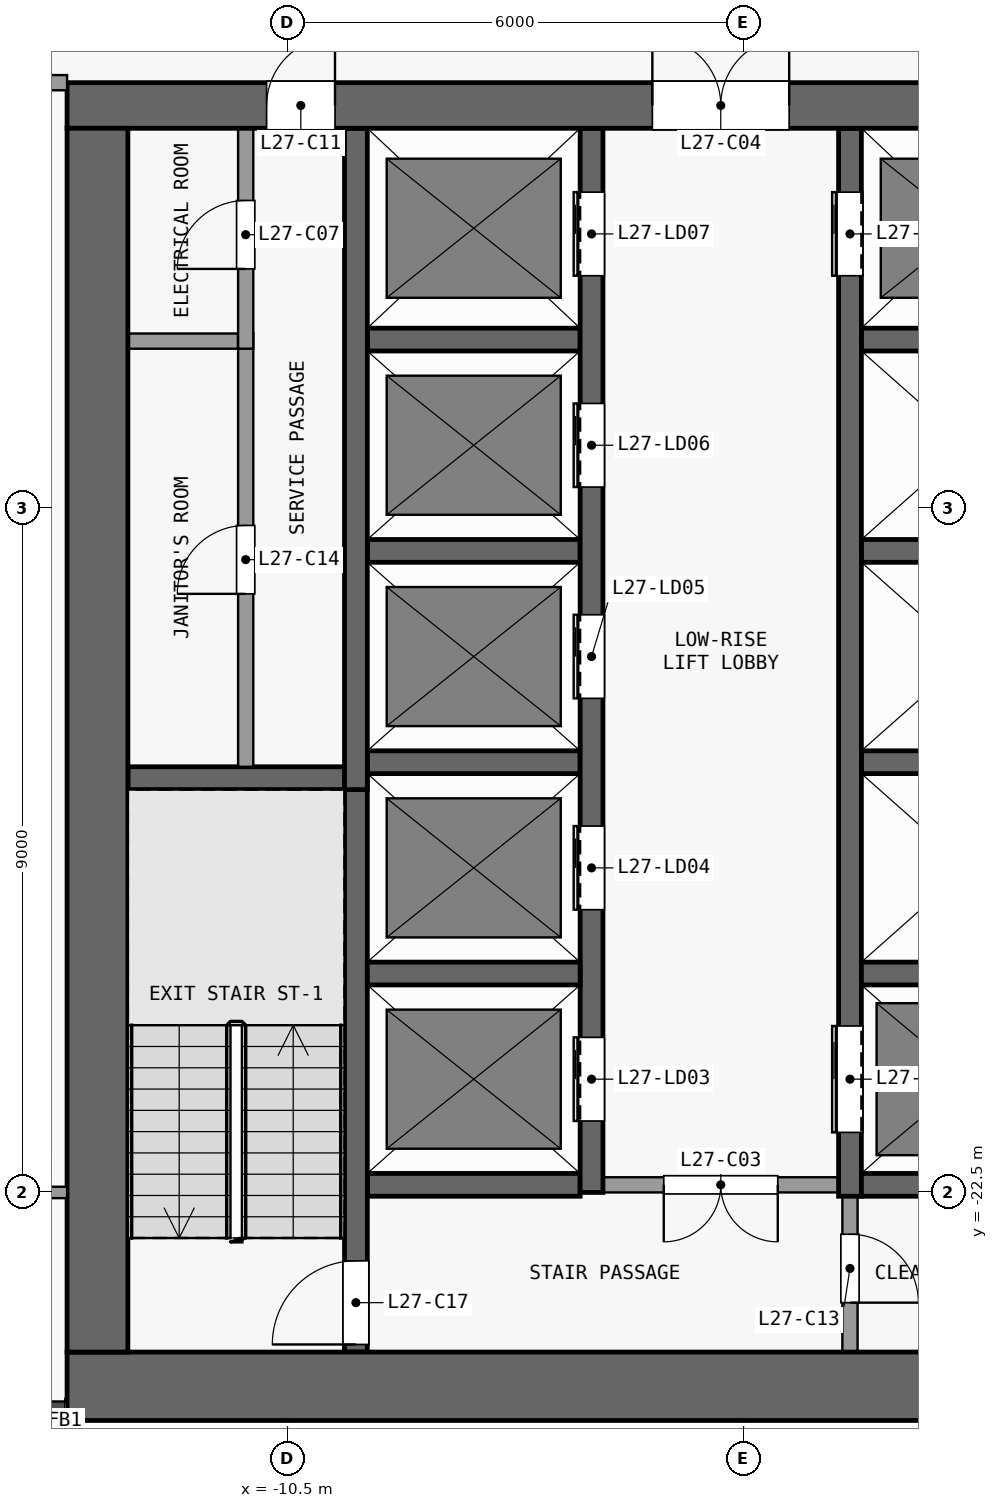
"""IFC4 building model, lengths in metres.
Left out: names, types, materials, properties, quantities, classifications, styles, units other than length and angle.
Written with IfcOpenShell. Run it as: python <this file> out.ifc"""

import sys

from ifc_helpers import new_model, si_unit, direction, frame, frame_2d, origin, place, context, subcontext, project, spatial, rectangle, extrude, element, fill, save


model = new_model("IFC4")
c1 = context("Model", 3, precision=1e-05, world=origin(), true_north=direction((0.0, 1.0)))
c2 = subcontext(c1, "Body", "Model", "MODEL_VIEW")
j1 = project(units=[si_unit("LENGTHUNIT", "METRE"), si_unit("PLANEANGLEUNIT", "RADIAN")], contexts=[c1])
p1 = place(None, origin())
s1 = spatial("IfcSite", under=j1, at=p1, CompositionType="ELEMENT")
p2 = place(p1, origin())
s2 = spatial("IfcBuilding", under=s1, at=p2, CompositionType="ELEMENT")
p3 = place(p2, frame((0.0, 0.0, 109.9)))
s3 = spatial("IfcBuildingStorey", under=s2, at=p3, CompositionType="ELEMENT", Elevation=109.9)
p4 = place(p3, frame((-13.4, -25.05, 0.0), z_axis=(0.0, 0.0, 1.0), x_axis=(1.0, 0.0, 0.0)))
e1 = element("IfcWall", 1, at=p4, inside=s3, PredefinedType="SHEAR", context=c2, shape_type="SweptSolid", body=[
    extrude(rectangle(XDim=26.8, YDim=0.9, at=frame_2d((13.4, 0.0))), origin(), (0.0, 0.0, 1.0), 3.3),
])
p5 = place(p3, frame((-13.4, -8.2, 0.0), z_axis=(0.0, 0.0, 1.0), x_axis=(1.0, 0.0, 0.0)))
e2 = element("IfcWall", 2, at=p5, inside=s3, PredefinedType="SHEAR", context=c2, shape_type="SweptSolid", body=[
    extrude(rectangle(XDim=26.8, YDim=0.6, at=frame_2d((13.4, 0.0))), origin(), (0.0, 0.0, 1.0), 3.3),
])
p6 = place(p5, frame((7.7, 0.0, 0.0)))
e3 = element("IfcOpeningElement", 3, at=p6, cuts=e2, PredefinedType="OPENING", context=c2, shape_type="SweptSolid", body=[
    extrude(rectangle(XDim=1.8, YDim=2.1, at=frame_2d((0.9, 1.05))), frame((0.0, 0.31, 0.0), z_axis=(0.0, -1.0, 0.0), x_axis=(1.0, 0.0, 0.0)), (0.0, 0.0, 1.0), 0.62),
])
p7 = place(p5, frame((17.3, 0.0, 0.0)))
e4 = element("IfcOpeningElement", 4, at=p7, cuts=e2, PredefinedType="OPENING", context=c2, shape_type="SweptSolid", body=[
    extrude(rectangle(XDim=1.8, YDim=2.1, at=frame_2d((0.9, 1.05))), frame((0.0, 0.31, 0.0), z_axis=(0.0, -1.0, 0.0), x_axis=(1.0, 0.0, 0.0)), (0.0, 0.0, 1.0), 0.62),
])
p8 = place(p5, frame((2.625, 0.0, 0.0)))
e5 = element("IfcOpeningElement", 5, at=p8, cuts=e2, PredefinedType="OPENING", context=c2, shape_type="SweptSolid", body=[
    extrude(rectangle(XDim=0.9, YDim=2.1, at=frame_2d((0.45, 1.05))), frame((0.0, 0.31, 0.0), z_axis=(0.0, -1.0, 0.0), x_axis=(1.0, 0.0, 0.0)), (0.0, 0.0, 1.0), 0.62),
])
p9 = place(p5, frame((23.275, 0.0, 0.0)))
e6 = element("IfcOpeningElement", 6, at=p9, cuts=e2, PredefinedType="OPENING", context=c2, shape_type="SweptSolid", body=[
    extrude(rectangle(XDim=0.9, YDim=2.1, at=frame_2d((0.45, 1.05))), frame((0.0, 0.31, 0.0), z_axis=(0.0, -1.0, 0.0), x_axis=(1.0, 0.0, 0.0)), (0.0, 0.0, 1.0), 0.62),
])
p10 = place(p3, frame((-13.0, -24.6, 0.0), z_axis=(0.0, 0.0, 1.0), x_axis=(0.0, 1.0, 0.0)))
e7 = element("IfcWall", 7, at=p10, inside=s3, PredefinedType="SHEAR", context=c2, shape_type="SweptSolid", body=[
    extrude(rectangle(XDim=16.1, YDim=0.8, at=frame_2d((8.05, 0.0))), origin(), (0.0, 0.0, 1.0), 3.3),
])
p11 = place(p3, frame((-9.45, -22.4, 0.0), z_axis=(0.0, 0.0, 1.0), x_axis=(1.0, 0.0, 0.0)))
e8 = element("IfcWall", 8, at=p11, inside=s3, PredefinedType="SHEAR", context=c2, shape_type="SweptSolid", body=[
    extrude(rectangle(XDim=2.8, YDim=0.3, at=frame_2d((1.4, 0.0))), origin(), (0.0, 0.0, 1.0), 3.3),
])
p12 = place(p3, frame((-3.25, -22.4, 0.0), z_axis=(0.0, 0.0, 1.0), x_axis=(-1.0, 0.0, 0.0)))
e9 = element("IfcWall", 9, at=p12, inside=s3, PredefinedType="PARTITIONING", context=c2, shape_type="SweptSolid", body=[
    extrude(rectangle(XDim=3.1, YDim=0.2, at=frame_2d((1.55, 0.0))), origin(), (0.0, 0.0, 1.0), 3.3),
])
p13 = place(p12, frame((0.8, 0.0, 0.0)))
e10 = element("IfcOpeningElement", 10, at=p13, cuts=e9, PredefinedType="OPENING", context=c2, shape_type="SweptSolid", body=[
    extrude(rectangle(XDim=1.5, YDim=2.1, at=frame_2d((0.75, 1.05))), frame((0.0, 0.11, 0.0), z_axis=(0.0, -1.0, 0.0), x_axis=(1.0, 0.0, 0.0)), (0.0, 0.0, 1.0), 0.22),
])
p14 = place(p3, frame((-2.95, -22.4, 0.0), z_axis=(0.0, 0.0, 1.0), x_axis=(1.0, 0.0, 0.0)))
e11 = element("IfcWall", 11, at=p14, inside=s3, PredefinedType="SHEAR", context=c2, shape_type="SweptSolid", body=[
    extrude(rectangle(XDim=6.2, YDim=0.3, at=frame_2d((3.1, 0.0))), origin(), (0.0, 0.0, 1.0), 3.3),
])
for number, where, z_axis, x_axis in (
    (12, (-9.45, -19.62, 0.0), (0.0, 0.0, 1.0), (1.0, 0.0, 0.0)),
    (13, (-2.95, -19.62, 0.0), (0.0, 0.0, 1.0), (1.0, 0.0, 0.0)),
):
    element("IfcWall", number, at=place(p3, frame(where, z_axis=z_axis, x_axis=x_axis)), inside=s3, PredefinedType="SHEAR", context=c2, shape_type="SweptSolid", body=[
        extrude(rectangle(XDim=2.8, YDim=0.3, at=frame_2d((1.4, 0.0))), origin(), (0.0, 0.0, 1.0), 3.3),
    ])
p15 = place(p3, frame((-12.6, -17.05, 0.0), z_axis=(0.0, 0.0, 1.0), x_axis=(1.0, 0.0, 0.0)))
e14 = element("IfcWall", 14, at=p15, inside=s3, PredefinedType="SHEAR", context=c2, shape_type="SweptSolid", body=[
    extrude(rectangle(XDim=2.85, YDim=0.3, at=frame_2d((1.425, 0.0))), origin(), (0.0, 0.0, 1.0), 3.3),
])
for number, where, z_axis, x_axis in (
    (15, (-9.45, -16.84, 0.0), (0.0, 0.0, 1.0), (1.0, 0.0, 0.0)),
    (16, (-2.95, -16.84, 0.0), (0.0, 0.0, 1.0), (1.0, 0.0, 0.0)),
    (17, (-9.45, -14.06, 0.0), (0.0, 0.0, 1.0), (1.0, 0.0, 0.0)),
    (18, (-2.95, -14.06, 0.0), (0.0, 0.0, 1.0), (1.0, 0.0, 0.0)),
):
    element("IfcWall", number, at=place(p3, frame(where, z_axis=z_axis, x_axis=x_axis)), inside=s3, PredefinedType="SHEAR", context=c2, shape_type="SweptSolid", body=[
        extrude(rectangle(XDim=2.8, YDim=0.3, at=frame_2d((1.4, 0.0))), origin(), (0.0, 0.0, 1.0), 3.3),
    ])
p16 = place(p3, frame((-12.6, -11.3, 0.0), z_axis=(0.0, 0.0, 1.0), x_axis=(1.0, 0.0, 0.0)))
e19 = element("IfcWall", 19, at=p16, inside=s3, PredefinedType="PARTITIONING", context=c2, shape_type="SweptSolid", body=[
    extrude(rectangle(XDim=1.45, YDim=0.2, at=frame_2d((0.725, 0.0))), origin(), (0.0, 0.0, 1.0), 3.3),
])
for number, where, z_axis, x_axis in (
    (20, (-9.45, -11.28, 0.0), (0.0, 0.0, 1.0), (1.0, 0.0, 0.0)),
    (21, (-2.95, -11.28, 0.0), (0.0, 0.0, 1.0), (1.0, 0.0, 0.0)),
):
    element("IfcWall", number, at=place(p3, frame(where, z_axis=z_axis, x_axis=x_axis)), inside=s3, PredefinedType="SHEAR", context=c2, shape_type="SweptSolid", body=[
        extrude(rectangle(XDim=2.8, YDim=0.3, at=frame_2d((1.4, 0.0))), origin(), (0.0, 0.0, 1.0), 3.3),
    ])
p17 = place(p3, frame((-11.05, -16.9, 0.0), z_axis=(0.0, 0.0, 1.0), x_axis=(0.0, 1.0, 0.0)))
e22 = element("IfcWall", 22, at=p17, inside=s3, PredefinedType="PARTITIONING", context=c2, shape_type="SweptSolid", body=[
    extrude(rectangle(XDim=5.7, YDim=0.2, at=frame_2d((2.85, 0.0))), origin(), (0.0, 0.0, 1.0), 3.3),
])
p18 = place(p17, frame((2.275, 0.0, 0.0)))
e23 = element("IfcOpeningElement", 23, at=p18, cuts=e22, PredefinedType="OPENING", context=c2, shape_type="SweptSolid", body=[
    extrude(rectangle(XDim=0.9, YDim=2.1, at=frame_2d((0.45, 1.05))), frame((0.0, 0.11, 0.0), z_axis=(0.0, -1.0, 0.0), x_axis=(1.0, 0.0, 0.0)), (0.0, 0.0, 1.0), 0.22),
])
p19 = place(p3, frame((-11.05, -11.4, 0.0), z_axis=(0.0, 0.0, 1.0), x_axis=(0.0, 1.0, 0.0)))
e24 = element("IfcWall", 24, at=p19, inside=s3, PredefinedType="PARTITIONING", context=c2, shape_type="SweptSolid", body=[
    extrude(rectangle(XDim=2.9, YDim=0.2, at=frame_2d((1.45, 0.0))), origin(), (0.0, 0.0, 1.0), 3.3),
])
p20 = place(p19, frame((1.05, 0.0, 0.0)))
e25 = element("IfcOpeningElement", 25, at=p20, cuts=e24, PredefinedType="OPENING", context=c2, shape_type="SweptSolid", body=[
    extrude(rectangle(XDim=0.9, YDim=2.1, at=frame_2d((0.45, 1.05))), frame((0.0, 0.11, 0.0), z_axis=(0.0, -1.0, 0.0), x_axis=(1.0, 0.0, 0.0)), (0.0, 0.0, 1.0), 0.22),
])
p21 = place(p3, frame((-9.6, -24.6, 0.0), z_axis=(0.0, 0.0, 1.0), x_axis=(0.0, 1.0, 0.0)))
e26 = element("IfcWall", 26, at=p21, inside=s3, PredefinedType="SHEAR", context=c2, shape_type="SweptSolid", body=[
    extrude(rectangle(XDim=7.7, YDim=0.3, at=frame_2d((3.85, 0.0))), origin(), (0.0, 0.0, 1.0), 3.3),
])
p22 = place(p21, frame((0.1, 0.0, 0.0)))
e27 = element("IfcOpeningElement", 27, at=p22, cuts=e26, PredefinedType="OPENING", context=c2, shape_type="SweptSolid", body=[
    extrude(rectangle(XDim=1.1, YDim=2.1, at=frame_2d((0.55, 1.05))), frame((0.0, 0.16, 0.0), z_axis=(0.0, -1.0, 0.0), x_axis=(1.0, 0.0, 0.0)), (0.0, 0.0, 1.0), 0.32),
])
p23 = place(p3, frame((-9.6, -17.2, 0.0), z_axis=(0.0, 0.0, 1.0), x_axis=(0.0, 1.0, 0.0)))
e28 = element("IfcWall", 28, at=p23, inside=s3, PredefinedType="SHEAR", context=c2, shape_type="SweptSolid", body=[
    extrude(rectangle(XDim=8.7, YDim=0.3, at=frame_2d((4.35, 0.0))), origin(), (0.0, 0.0, 1.0), 3.3),
])
p24 = place(p3, frame((-6.5, -22.5, 0.0), z_axis=(0.0, 0.0, 1.0), x_axis=(0.0, 1.0, 0.0)))
e29 = element("IfcWall", 29, at=p24, inside=s3, PredefinedType="SHEAR", context=c2, shape_type="SweptSolid", body=[
    extrude(rectangle(XDim=14.0, YDim=0.3, at=frame_2d((7.0, 0.0))), origin(), (0.0, 0.0, 1.0), 3.3),
])
p25 = place(p24, frame((0.94, 0.0, 0.0)))
e30 = element("IfcOpeningElement", 30, at=p25, cuts=e29, PredefinedType="OPENING", context=c2, shape_type="SweptSolid", body=[
    extrude(rectangle(XDim=1.1, YDim=2.1, at=frame_2d((0.55, 1.05))), frame((0.0, 0.16, 0.0), z_axis=(0.0, -1.0, 0.0), x_axis=(1.0, 0.0, 0.0)), (0.0, 0.0, 1.0), 0.32),
])
p26 = place(p24, frame((3.72, 0.0, 0.0)))
e31 = element("IfcOpeningElement", 31, at=p26, cuts=e29, PredefinedType="OPENING", context=c2, shape_type="SweptSolid", body=[
    extrude(rectangle(XDim=1.1, YDim=2.1, at=frame_2d((0.55, 1.05))), frame((0.0, 0.16, 0.0), z_axis=(0.0, -1.0, 0.0), x_axis=(1.0, 0.0, 0.0)), (0.0, 0.0, 1.0), 0.32),
])
p27 = place(p24, frame((6.5, 0.0, 0.0)))
e32 = element("IfcOpeningElement", 32, at=p27, cuts=e29, PredefinedType="OPENING", context=c2, shape_type="SweptSolid", body=[
    extrude(rectangle(XDim=1.1, YDim=2.1, at=frame_2d((0.55, 1.05))), frame((0.0, 0.16, 0.0), z_axis=(0.0, -1.0, 0.0), x_axis=(1.0, 0.0, 0.0)), (0.0, 0.0, 1.0), 0.32),
])
p28 = place(p24, frame((9.28, 0.0, 0.0)))
e33 = element("IfcOpeningElement", 33, at=p28, cuts=e29, PredefinedType="OPENING", context=c2, shape_type="SweptSolid", body=[
    extrude(rectangle(XDim=1.1, YDim=2.1, at=frame_2d((0.55, 1.05))), frame((0.0, 0.16, 0.0), z_axis=(0.0, -1.0, 0.0), x_axis=(1.0, 0.0, 0.0)), (0.0, 0.0, 1.0), 0.32),
])
p29 = place(p24, frame((12.06, 0.0, 0.0)))
e34 = element("IfcOpeningElement", 34, at=p29, cuts=e29, PredefinedType="OPENING", context=c2, shape_type="SweptSolid", body=[
    extrude(rectangle(XDim=1.1, YDim=2.1, at=frame_2d((0.55, 1.05))), frame((0.0, 0.16, 0.0), z_axis=(0.0, -1.0, 0.0), x_axis=(1.0, 0.0, 0.0)), (0.0, 0.0, 1.0), 0.32),
])
p30 = place(p3, frame((-3.1, -22.55, 0.0), z_axis=(0.0, 0.0, 1.0), x_axis=(0.0, -1.0, 0.0)))
e35 = element("IfcWall", 35, at=p30, inside=s3, PredefinedType="PARTITIONING", context=c2, shape_type="SweptSolid", body=[
    extrude(rectangle(XDim=2.05, YDim=0.2, at=frame_2d((1.025, 0.0))), origin(), (0.0, 0.0, 1.0), 3.3),
])
p31 = place(p30, frame((0.5, 0.0, 0.0)))
e36 = element("IfcOpeningElement", 36, at=p31, cuts=e35, PredefinedType="OPENING", context=c2, shape_type="SweptSolid", body=[
    extrude(rectangle(XDim=0.9, YDim=2.1, at=frame_2d((0.45, 1.05))), frame((0.0, 0.11, 0.0), z_axis=(0.0, -1.0, 0.0), x_axis=(1.0, 0.0, 0.0)), (0.0, 0.0, 1.0), 0.22),
])
p32 = place(p3, frame((-3.1, -22.55, 0.0), z_axis=(0.0, 0.0, 1.0), x_axis=(0.0, 1.0, 0.0)))
e37 = element("IfcWall", 37, at=p32, inside=s3, PredefinedType="SHEAR", context=c2, shape_type="SweptSolid", body=[
    extrude(rectangle(XDim=14.05, YDim=0.3, at=frame_2d((7.025, 0.0))), origin(), (0.0, 0.0, 1.0), 3.3),
])
p33 = place(p32, frame((12.11, 0.0, 0.0)))
e38 = element("IfcOpeningElement", 38, at=p33, cuts=e37, PredefinedType="OPENING", context=c2, shape_type="SweptSolid", body=[
    extrude(rectangle(XDim=1.1, YDim=2.1, at=frame_2d((0.55, 1.05))), frame((0.0, 0.16, 0.0), z_axis=(0.0, -1.0, 0.0), x_axis=(1.0, 0.0, 0.0)), (0.0, 0.0, 1.0), 0.32),
])
p34 = place(p32, frame((0.84, 0.0, 0.0)))
e39 = element("IfcOpeningElement", 39, at=p34, cuts=e37, PredefinedType="OPENING", context=c2, shape_type="SweptSolid", body=[
    extrude(rectangle(XDim=1.4, YDim=2.1, at=frame_2d((0.7, 1.05))), frame((0.0, 0.16, 0.0), z_axis=(0.0, -1.0, 0.0), x_axis=(1.0, 0.0, 0.0)), (0.0, 0.0, 1.0), 0.32),
])
p35 = place(p3, frame((-16.325, -22.5, 0.0), z_axis=(0.0, 0.0, 1.0), x_axis=(1.0, 0.0, 0.0)))
e40 = element("IfcWall", 40, at=p35, inside=s3, PredefinedType="PARTITIONING", context=c2, shape_type="SweptSolid", body=[
    extrude(rectangle(XDim=2.925, YDim=0.15, at=frame_2d((1.462, 0.0))), origin(), (0.0, 0.0, 1.0), 3.3),
])
p36 = place(p35, frame((1.0, 0.0, 0.0)))
e41 = element("IfcOpeningElement", 41, at=p36, cuts=e40, PredefinedType="OPENING", context=c2, shape_type="SweptSolid", body=[
    extrude(rectangle(XDim=0.9, YDim=2.1, at=frame_2d((0.45, 1.05))), frame((0.0, 0.085, 0.0), z_axis=(0.0, -1.0, 0.0), x_axis=(1.0, 0.0, 0.0)), (0.0, 0.0, 1.0), 0.17),
])
p37 = place(p3, frame((-25.25, -7.9, 0.0), z_axis=(0.0, 0.0, 1.0), x_axis=(1.0, 0.0, 0.0)))
e42 = element("IfcWall", 42, at=p37, inside=s3, PredefinedType="PARTITIONING", context=c2, shape_type="SweptSolid", body=[
    extrude(rectangle(XDim=11.85, YDim=0.2, at=frame_2d((5.925, 0.0))), origin(), (0.0, 0.0, 1.0), 3.3),
])
p38 = place(p37, frame((9.85, 0.0, 0.0)))
e43 = element("IfcOpeningElement", 43, at=p38, cuts=e42, PredefinedType="OPENING", context=c2, shape_type="SweptSolid", body=[
    extrude(rectangle(XDim=1.0, YDim=2.1, at=frame_2d((0.5, 1.05))), frame((0.0, 0.11, 0.0), z_axis=(0.0, -1.0, 0.0), x_axis=(1.0, 0.0, 0.0)), (0.0, 0.0, 1.0), 0.22),
])
p39 = place(p25, origin())
e44 = element("IfcDoor", 44, at=p39, inside=s3, OperationType="DOUBLE_DOOR_SLIDING", PredefinedType="DOOR", context=c2, shape_type="SweptSolid", body=[
    extrude(rectangle(XDim=1.1, YDim=2.1, at=frame_2d((0.55, 1.05))), frame((0.0, 0.025, 0.0), z_axis=(0.0, -1.0, 0.0), x_axis=(1.0, 0.0, 0.0)), (0.0, 0.0, 1.0), 0.05),
])
fill(e30, e44)
p40 = place(p26, origin())
e45 = element("IfcDoor", 45, at=p40, inside=s3, OperationType="DOUBLE_DOOR_SLIDING", PredefinedType="DOOR", context=c2, shape_type="SweptSolid", body=[
    extrude(rectangle(XDim=1.1, YDim=2.1, at=frame_2d((0.55, 1.05))), frame((0.0, 0.025, 0.0), z_axis=(0.0, -1.0, 0.0), x_axis=(1.0, 0.0, 0.0)), (0.0, 0.0, 1.0), 0.05),
])
fill(e31, e45)
p41 = place(p27, origin())
e46 = element("IfcDoor", 46, at=p41, inside=s3, OperationType="DOUBLE_DOOR_SLIDING", PredefinedType="DOOR", context=c2, shape_type="SweptSolid", body=[
    extrude(rectangle(XDim=1.1, YDim=2.1, at=frame_2d((0.55, 1.05))), frame((0.0, 0.025, 0.0), z_axis=(0.0, -1.0, 0.0), x_axis=(1.0, 0.0, 0.0)), (0.0, 0.0, 1.0), 0.05),
])
fill(e32, e46)
p42 = place(p28, origin())
e47 = element("IfcDoor", 47, at=p42, inside=s3, OperationType="DOUBLE_DOOR_SLIDING", PredefinedType="DOOR", context=c2, shape_type="SweptSolid", body=[
    extrude(rectangle(XDim=1.1, YDim=2.1, at=frame_2d((0.55, 1.05))), frame((0.0, 0.025, 0.0), z_axis=(0.0, -1.0, 0.0), x_axis=(1.0, 0.0, 0.0)), (0.0, 0.0, 1.0), 0.05),
])
fill(e33, e47)
p43 = place(p29, origin())
e48 = element("IfcDoor", 48, at=p43, inside=s3, OperationType="DOUBLE_DOOR_SLIDING", PredefinedType="DOOR", context=c2, shape_type="SweptSolid", body=[
    extrude(rectangle(XDim=1.1, YDim=2.1, at=frame_2d((0.55, 1.05))), frame((0.0, 0.025, 0.0), z_axis=(0.0, -1.0, 0.0), x_axis=(1.0, 0.0, 0.0)), (0.0, 0.0, 1.0), 0.05),
])
fill(e34, e48)
p44 = place(p33, origin())
e49 = element("IfcDoor", 49, at=p44, inside=s3, OperationType="DOUBLE_DOOR_SLIDING", PredefinedType="DOOR", context=c2, shape_type="SweptSolid", body=[
    extrude(rectangle(XDim=1.1, YDim=2.1, at=frame_2d((0.55, 1.05))), frame((0.0, 0.025, 0.0), z_axis=(0.0, -1.0, 0.0), x_axis=(1.0, 0.0, 0.0)), (0.0, 0.0, 1.0), 0.05),
])
fill(e38, e49)
p45 = place(p34, origin())
e50 = element("IfcDoor", 50, at=p45, inside=s3, OperationType="DOUBLE_DOOR_SLIDING", PredefinedType="DOOR", context=c2, shape_type="SweptSolid", body=[
    extrude(rectangle(XDim=1.4, YDim=2.1, at=frame_2d((0.7, 1.05))), frame((0.0, 0.025, 0.0), z_axis=(0.0, -1.0, 0.0), x_axis=(1.0, 0.0, 0.0)), (0.0, 0.0, 1.0), 0.05),
])
fill(e39, e50)
p46 = place(p13, origin())
e51 = element("IfcDoor", 51, at=p46, inside=s3, OperationType="DOUBLE_DOOR_SINGLE_SWING", PredefinedType="DOOR", context=c2, shape_type="SweptSolid", body=[
    extrude(rectangle(XDim=1.5, YDim=2.1, at=frame_2d((0.75, 1.05))), frame((0.0, 0.025, 0.0), z_axis=(0.0, -1.0, 0.0), x_axis=(1.0, 0.0, 0.0)), (0.0, 0.0, 1.0), 0.05),
])
fill(e10, e51)
p47 = place(p6, origin())
e52 = element("IfcDoor", 52, at=p47, inside=s3, OperationType="DOUBLE_DOOR_SINGLE_SWING", PredefinedType="DOOR", context=c2, shape_type="SweptSolid", body=[
    extrude(rectangle(XDim=1.8, YDim=2.1, at=frame_2d((0.9, 1.05))), frame((0.0, 0.025, 0.0), z_axis=(0.0, -1.0, 0.0), x_axis=(1.0, 0.0, 0.0)), (0.0, 0.0, 1.0), 0.05),
])
fill(e3, e52)
p48 = place(p20, origin())
e53 = element("IfcDoor", 53, at=p48, inside=s3, OperationType="SINGLE_SWING_LEFT", PredefinedType="DOOR", context=c2, shape_type="SweptSolid", body=[
    extrude(rectangle(XDim=0.9, YDim=2.1, at=frame_2d((0.45, 1.05))), frame((0.0, 0.025, 0.0), z_axis=(0.0, -1.0, 0.0), x_axis=(1.0, 0.0, 0.0)), (0.0, 0.0, 1.0), 0.05),
])
fill(e25, e53)
p49 = place(p8, origin())
e54 = element("IfcDoor", 54, at=p49, inside=s3, OperationType="SINGLE_SWING_RIGHT", PredefinedType="DOOR", context=c2, shape_type="SweptSolid", body=[
    extrude(rectangle(XDim=0.9, YDim=2.1, at=frame_2d((0.45, 1.05))), frame((0.0, 0.025, 0.0), z_axis=(0.0, -1.0, 0.0), x_axis=(1.0, 0.0, 0.0)), (0.0, 0.0, 1.0), 0.05),
])
fill(e5, e54)
p50 = place(p31, origin())
e55 = element("IfcDoor", 55, at=p50, inside=s3, OperationType="SINGLE_SWING_RIGHT", PredefinedType="DOOR", context=c2, shape_type="SweptSolid", body=[
    extrude(rectangle(XDim=0.9, YDim=2.1, at=frame_2d((0.45, 1.05))), frame((0.0, 0.025, 0.0), z_axis=(0.0, -1.0, 0.0), x_axis=(1.0, 0.0, 0.0)), (0.0, 0.0, 1.0), 0.05),
])
fill(e36, e55)
p51 = place(p18, origin())
e56 = element("IfcDoor", 56, at=p51, inside=s3, OperationType="SINGLE_SWING_LEFT", PredefinedType="DOOR", context=c2, shape_type="SweptSolid", body=[
    extrude(rectangle(XDim=0.9, YDim=2.1, at=frame_2d((0.45, 1.05))), frame((0.0, 0.025, 0.0), z_axis=(0.0, -1.0, 0.0), x_axis=(1.0, 0.0, 0.0)), (0.0, 0.0, 1.0), 0.05),
])
fill(e23, e56)
p52 = place(p22, origin())
e57 = element("IfcDoor", 57, at=p52, inside=s3, OperationType="SINGLE_SWING_LEFT", PredefinedType="DOOR", context=c2, shape_type="SweptSolid", body=[
    extrude(rectangle(XDim=1.1, YDim=2.1, at=frame_2d((0.55, 1.05))), frame((0.0, 0.025, 0.0), z_axis=(0.0, -1.0, 0.0), x_axis=(1.0, 0.0, 0.0)), (0.0, 0.0, 1.0), 0.05),
])
fill(e27, e57)
save(model, sys.argv[1])
